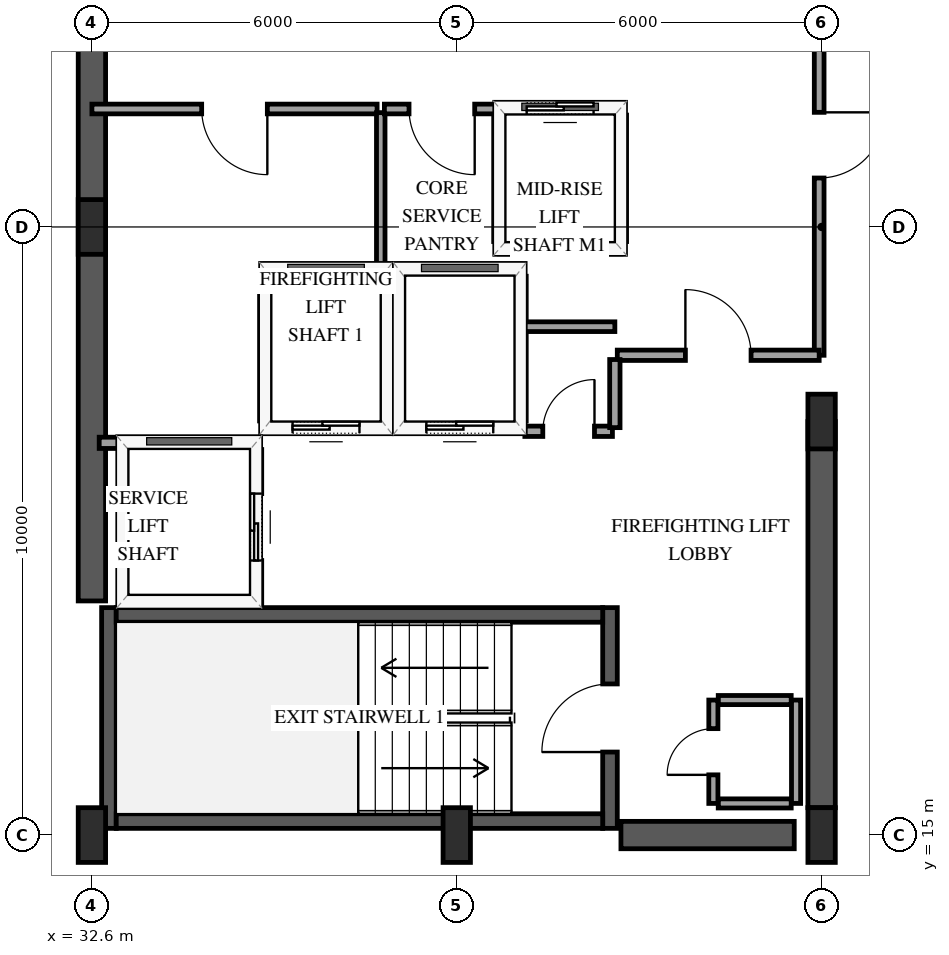
"""IFC4 building model, lengths in metres.
Left out: names, types, materials, properties, quantities, classifications, styles, units other than length and angle.
Written with IfcOpenShell. Run it as: python <this file> out.ifc"""

import sys

from ifc_helpers import new_model, si_unit, direction, frame, frame_2d, origin, origin_2d, place, context, subcontext, project, spatial, rectangle, extrude, element, fill, save


model = new_model("IFC4")
c1 = context("Model", 3, precision=1e-05, world=origin(), true_north=direction((0.0, 1.0)))
c2 = subcontext(c1, "Body", "Model", "MODEL_VIEW")
j1 = project(units=[si_unit("LENGTHUNIT", "METRE"), si_unit("PLANEANGLEUNIT", "RADIAN")], contexts=[c1])
p1 = place(None, origin())
s1 = spatial("IfcSite", under=j1, at=p1, CompositionType="ELEMENT")
p2 = place(p1, origin())
s2 = spatial("IfcBuilding", under=s1, at=p2, CompositionType="ELEMENT")
p3 = place(p2, frame((0.0, 0.0, 233.8)))
s3 = spatial("IfcBuildingStorey", under=s2, at=p3, CompositionType="ELEMENT", Elevation=233.8)
p4 = place(p3, frame((32.88, 15.11, 0.0), z_axis=(0.0, 0.0, 1.0), x_axis=(0.0, 1.0, 0.0)))
e1 = element("IfcWall", 1, at=p4, inside=s3, PredefinedType="SHEAR", context=c2, shape_type="SweptSolid", body=[
    extrude(rectangle(XDim=3.63, YDim=0.24, at=frame_2d((1.815, 0.0))), origin(), (0.0, 0.0, 1.0), 3.6),
])
p5 = place(p3, frame((41.12, 15.11, 0.0), z_axis=(0.0, 0.0, 1.0), x_axis=(0.0, 1.0, 0.0)))
e2 = element("IfcWall", 2, at=p5, inside=s3, PredefinedType="SHEAR", context=c2, shape_type="SweptSolid", body=[
    extrude(rectangle(XDim=3.63, YDim=0.24, at=frame_2d((1.815, 0.0))), origin(), (0.0, 0.0, 1.0), 3.6),
])
p6 = place(p5, frame((1.255, 0.0, 0.0)))
e3 = element("IfcOpeningElement", 3, at=p6, cuts=e2, PredefinedType="OPENING", context=c2, shape_type="SweptSolid", body=[
    extrude(rectangle(XDim=1.12, YDim=2.15, at=frame_2d((0.56, 1.075))), frame((0.0, 0.13, 0.0), z_axis=(0.0, -1.0, 0.0), x_axis=(1.0, 0.0, 0.0)), (0.0, 0.0, 1.0), 0.26),
])
for number, where, z_axis, x_axis in (
    (4, (33.0, 15.23, 0.0), (0.0, 0.0, 1.0), (1.0, 0.0, 0.0)),
    (5, (33.0, 18.62, 0.0), (0.0, 0.0, 1.0), (1.0, 0.0, 0.0)),
):
    element("IfcWall", number, at=place(p3, frame(where, z_axis=z_axis, x_axis=x_axis)), inside=s3, PredefinedType="SHEAR", context=c2, shape_type="SweptSolid", body=[
        extrude(rectangle(XDim=8.0, YDim=0.24, at=frame_2d((4.0, 0.0))), origin(), (0.0, 0.0, 1.0), 3.6),
    ])
p7 = place(p3, frame((32.6, 18.85, 0.0), z_axis=(0.0, 0.0, 1.0), x_axis=(0.0, 1.0, 0.0)))
e6 = element("IfcWall", 6, at=p7, inside=s3, PredefinedType="SHEAR", context=c2, shape_type="SweptSolid", body=[
    extrude(rectangle(XDim=12.3, YDim=0.45, at=frame_2d((6.15, 0.0))), origin(), (0.0, 0.0, 1.0), 3.6),
])
p8 = place(p3, frame((41.3, 15.0, 0.0), z_axis=(0.0, 0.0, 1.0), x_axis=(1.0, 0.0, 0.0)))
e7 = element("IfcWall", 7, at=p8, inside=s3, PredefinedType="SHEAR", context=c2, shape_type="SweptSolid", body=[
    extrude(rectangle(XDim=2.85, YDim=0.45, at=frame_2d((1.425, 0.0))), origin(), (0.0, 0.0, 1.0), 3.6),
])
p9 = place(p3, frame((44.6, 15.45, 0.0), z_axis=(0.0, 0.0, 1.0), x_axis=(0.0, 1.0, 0.0)))
e8 = element("IfcWall", 8, at=p9, inside=s3, PredefinedType="SHEAR", context=c2, shape_type="SweptSolid", body=[
    extrude(rectangle(XDim=6.35, YDim=0.45, at=frame_2d((3.175, 0.0))), origin(), (0.0, 0.0, 1.0), 3.6),
])
for number, where, z_axis, x_axis in (
    (9, (32.6, 15.0, 0.0), (0.0, 0.0, 1.0), (1.0, 0.0, 0.0)),
    (10, (32.6, 25.0, 0.0), (0.0, 0.0, 1.0), (1.0, 0.0, 0.0)),
    (11, (38.6, 15.0, 0.0), (0.0, 0.0, 1.0), (1.0, 0.0, 0.0)),
    (12, (44.6, 15.0, 0.0), (0.0, 0.0, 1.0), (1.0, 0.0, 0.0)),
    (13, (44.6, 21.8, 0.0), (0.0, 0.0, 1.0), (1.0, 0.0, 0.0)),
):
    element("IfcColumn", number, at=place(p3, frame(where, z_axis=z_axis, x_axis=x_axis)), inside=s3, PredefinedType="PILASTER", context=c2, shape_type="SweptSolid", body=[
        extrude(rectangle(XDim=0.45, YDim=0.9, at=origin_2d()), origin(), (0.0, 0.0, 1.0), 3.6),
    ])
p10 = place(p3, frame((35.45, 21.7, 0.0), z_axis=(0.0, 0.0, 1.0), x_axis=(1.0, 0.0, 0.0)))
e14 = element("IfcWall", 14, at=p10, inside=s3, PredefinedType="SOLIDWALL", context=c2, shape_type="SweptSolid", body=[
    extrude(rectangle(XDim=2.0, YDim=0.185, at=frame_2d((1.0, 0.0))), origin(), (0.0, 0.0, 1.0), 3.26),
])
p11 = place(p10, frame((0.45, 0.0, 0.0)))
e15 = element("IfcOpeningElement", 15, at=p11, cuts=e14, PredefinedType="OPENING", context=c2, shape_type="SweptSolid", body=[
    extrude(rectangle(XDim=1.1, YDim=2.15, at=frame_2d((0.55, 1.075))), frame((0.0, 0.103, 0.0), z_axis=(0.0, -1.0, 0.0), x_axis=(1.0, 0.0, 0.0)), (0.0, 0.0, 1.0), 0.205),
])
p12 = place(p3, frame((35.45, 24.3, 0.0), z_axis=(0.0, 0.0, 1.0), x_axis=(1.0, 0.0, 0.0)))
e16 = element("IfcWall", 16, at=p12, inside=s3, PredefinedType="SOLIDWALL", context=c2, shape_type="SweptSolid", body=[
    extrude(rectangle(XDim=2.0, YDim=0.185, at=frame_2d((1.0, 0.0))), origin(), (0.0, 0.0, 1.0), 3.26),
])
for number, where, z_axis, x_axis in (
    (17, (35.45, 21.81, 0.0), (0.0, 0.0, 1.0), (0.0, 1.0, 0.0)),
    (18, (37.45, 21.81, 0.0), (0.0, 0.0, 1.0), (0.0, 1.0, 0.0)),
):
    element("IfcWall", number, at=place(p3, frame(where, z_axis=z_axis, x_axis=x_axis)), inside=s3, PredefinedType="SOLIDWALL", context=c2, shape_type="SweptSolid", body=[
        extrude(rectangle(XDim=2.38, YDim=0.185, at=frame_2d((1.19, 0.0))), origin(), (0.0, 0.0, 1.0), 3.26),
    ])
p13 = place(p3, frame((37.65, 21.7, 0.0), z_axis=(0.0, 0.0, 1.0), x_axis=(1.0, 0.0, 0.0)))
e19 = element("IfcWall", 19, at=p13, inside=s3, PredefinedType="SOLIDWALL", context=c2, shape_type="SweptSolid", body=[
    extrude(rectangle(XDim=2.0, YDim=0.185, at=frame_2d((1.0, 0.0))), origin(), (0.0, 0.0, 1.0), 3.26),
])
p14 = place(p13, frame((0.45, 0.0, 0.0)))
e20 = element("IfcOpeningElement", 20, at=p14, cuts=e19, PredefinedType="OPENING", context=c2, shape_type="SweptSolid", body=[
    extrude(rectangle(XDim=1.1, YDim=2.15, at=frame_2d((0.55, 1.075))), frame((0.0, 0.103, 0.0), z_axis=(0.0, -1.0, 0.0), x_axis=(1.0, 0.0, 0.0)), (0.0, 0.0, 1.0), 0.205),
])
p15 = place(p3, frame((37.65, 24.3, 0.0), z_axis=(0.0, 0.0, 1.0), x_axis=(1.0, 0.0, 0.0)))
e21 = element("IfcWall", 21, at=p15, inside=s3, PredefinedType="SOLIDWALL", context=c2, shape_type="SweptSolid", body=[
    extrude(rectangle(XDim=2.0, YDim=0.185, at=frame_2d((1.0, 0.0))), origin(), (0.0, 0.0, 1.0), 3.26),
])
p16 = place(p3, frame((39.65, 21.81, 0.0), z_axis=(0.0, 0.0, 1.0), x_axis=(0.0, 1.0, 0.0)))
e22 = element("IfcWall", 22, at=p16, inside=s3, PredefinedType="SOLIDWALL", context=c2, shape_type="SweptSolid", body=[
    extrude(rectangle(XDim=2.38, YDim=0.185, at=frame_2d((1.19, 0.0))), origin(), (0.0, 0.0, 1.0), 3.26),
])
p17 = place(p3, frame((32.72, 21.45, 0.0), z_axis=(0.0, 0.0, 1.0), x_axis=(1.0, 0.0, 0.0)))
e23 = element("IfcWall", 23, at=p17, inside=s3, PredefinedType="SOLIDWALL", context=c2, shape_type="SweptSolid", body=[
    extrude(rectangle(XDim=2.58, YDim=0.185, at=frame_2d((1.29, 0.0))), origin(), (0.0, 0.0, 1.0), 3.26),
])
p18 = place(p3, frame((35.3, 18.79, 0.0), z_axis=(0.0, 0.0, 1.0), x_axis=(0.0, 1.0, 0.0)))
e24 = element("IfcWall", 24, at=p18, inside=s3, PredefinedType="SOLIDWALL", context=c2, shape_type="SweptSolid", body=[
    extrude(rectangle(XDim=2.55, YDim=0.185, at=frame_2d((1.275, 0.0))), origin(), (0.0, 0.0, 1.0), 3.26),
])
p19 = place(p18, frame((0.725, 0.0, 0.0)))
e25 = element("IfcOpeningElement", 25, at=p19, cuts=e24, PredefinedType="OPENING", context=c2, shape_type="SweptSolid", body=[
    extrude(rectangle(XDim=1.1, YDim=2.15, at=frame_2d((0.55, 1.075))), frame((0.0, 0.103, 0.0), z_axis=(0.0, -1.0, 0.0), x_axis=(1.0, 0.0, 0.0)), (0.0, 0.0, 1.0), 0.205),
])
p20 = place(p3, frame((39.3, 24.65, 0.0), z_axis=(0.0, 0.0, 1.0), x_axis=(1.0, 0.0, 0.0)))
e26 = element("IfcWall", 26, at=p20, inside=s3, PredefinedType="SOLIDWALL", context=c2, shape_type="SweptSolid", body=[
    extrude(rectangle(XDim=2.0, YDim=0.185, at=frame_2d((1.0, 0.0))), origin(), (0.0, 0.0, 1.0), 3.26),
])
p21 = place(p3, frame((39.3, 26.95, 0.0), z_axis=(0.0, 0.0, 1.0), x_axis=(1.0, 0.0, 0.0)))
e27 = element("IfcWall", 27, at=p21, inside=s3, PredefinedType="SOLIDWALL", context=c2, shape_type="SweptSolid", body=[
    extrude(rectangle(XDim=2.0, YDim=0.185, at=frame_2d((1.0, 0.0))), origin(), (0.0, 0.0, 1.0), 3.26),
])
p22 = place(p21, frame((0.45, 0.0, 0.0)))
e28 = element("IfcOpeningElement", 28, at=p22, cuts=e27, PredefinedType="OPENING", context=c2, shape_type="SweptSolid", body=[
    extrude(rectangle(XDim=1.1, YDim=2.15, at=frame_2d((0.55, 1.075))), frame((0.0, 0.103, 0.0), z_axis=(0.0, -1.0, 0.0), x_axis=(1.0, 0.0, 0.0)), (0.0, 0.0, 1.0), 0.205),
])
for number, where, z_axis, x_axis in (
    (29, (39.3, 24.76, 0.0), (0.0, 0.0, 1.0), (0.0, 1.0, 0.0)),
    (30, (41.3, 24.76, 0.0), (0.0, 0.0, 1.0), (0.0, 1.0, 0.0)),
):
    element("IfcWall", number, at=place(p3, frame(where, z_axis=z_axis, x_axis=x_axis)), inside=s3, PredefinedType="SOLIDWALL", context=c2, shape_type="SweptSolid", body=[
        extrude(rectangle(XDim=2.08, YDim=0.185, at=frame_2d((1.04, 0.0))), origin(), (0.0, 0.0, 1.0), 3.26),
    ])
for number, where, z_axis, x_axis in (
    (31, (42.9, 15.52, 0.0), (0.0, 0.0, 1.0), (1.0, 0.0, 0.0)),
    (32, (42.9, 17.22, 0.0), (0.0, 0.0, 1.0), (1.0, 0.0, 0.0)),
):
    element("IfcWall", number, at=place(p3, frame(where, z_axis=z_axis, x_axis=x_axis)), inside=s3, PredefinedType="PARTITIONING", context=c2, shape_type="SweptSolid", body=[
        extrude(rectangle(XDim=1.2, YDim=0.15, at=frame_2d((0.6, 0.0))), origin(), (0.0, 0.0, 1.0), 3.26),
    ])
p23 = place(p3, frame((44.18, 15.52, 0.0), z_axis=(0.0, 0.0, 1.0), x_axis=(0.0, 1.0, 0.0)))
e33 = element("IfcWall", 33, at=p23, inside=s3, PredefinedType="PARTITIONING", context=c2, shape_type="SweptSolid", body=[
    extrude(rectangle(XDim=1.7, YDim=0.15, at=frame_2d((0.85, 0.0))), origin(), (0.0, 0.0, 1.0), 3.26),
])
p24 = place(p3, frame((42.82, 15.52, 0.0), z_axis=(0.0, 0.0, 1.0), x_axis=(0.0, 1.0, 0.0)))
e34 = element("IfcWall", 34, at=p24, inside=s3, PredefinedType="PARTITIONING", context=c2, shape_type="SweptSolid", body=[
    extrude(rectangle(XDim=1.7, YDim=0.15, at=frame_2d((0.85, 0.0))), origin(), (0.0, 0.0, 1.0), 3.26),
])
p25 = place(p24, frame((0.47, 0.0, 0.0)))
e35 = element("IfcOpeningElement", 35, at=p25, cuts=e34, PredefinedType="OPENING", context=c2, shape_type="SweptSolid", body=[
    extrude(rectangle(XDim=0.76, YDim=2.0, at=frame_2d((0.38, 1.0))), frame((0.0, 0.085, 0.0), z_axis=(0.0, -1.0, 0.0), x_axis=(1.0, 0.0, 0.0)), (0.0, 0.0, 1.0), 0.17),
])
p26 = place(p3, frame((44.56, 29.8, 0.0), z_axis=(0.0, 0.0, 1.0), x_axis=(0.0, -1.0, 0.0)))
e36 = element("IfcWall", 36, at=p26, inside=s3, PredefinedType="PARTITIONING", context=c2, shape_type="SweptSolid", body=[
    extrude(rectangle(XDim=6.91, YDim=0.16, at=frame_2d((3.455, 0.0))), origin(), (0.0, 0.0, 1.0), 2.26),
])
p27 = place(p26, frame((2.915, 0.0, 0.0)))
e37 = element("IfcOpeningElement", 37, at=p27, cuts=e36, PredefinedType="OPENING", context=c2, shape_type="SweptSolid", body=[
    extrude(rectangle(XDim=1.08, YDim=2.15, at=frame_2d((0.54, 1.075))), frame((0.0, 0.09, 0.0), z_axis=(0.0, -1.0, 0.0), x_axis=(1.0, 0.0, 0.0)), (0.0, 0.0, 1.0), 0.18),
])
p28 = place(p3, frame((37.29, 26.94, 0.0), z_axis=(0.0, 0.0, 1.0), x_axis=(-1.0, 0.0, 0.0)))
e38 = element("IfcWall", 38, at=p28, inside=s3, PredefinedType="PARTITIONING", context=c2, shape_type="SweptSolid", body=[
    extrude(rectangle(XDim=4.69, YDim=0.16, at=frame_2d((2.345, 0.0))), origin(), (0.0, 0.0, 1.0), 3.26),
])
p29 = place(p28, frame((1.805, 0.0, 0.0)))
e39 = element("IfcOpeningElement", 39, at=p29, cuts=e38, PredefinedType="OPENING", context=c2, shape_type="SweptSolid", body=[
    extrude(rectangle(XDim=1.08, YDim=2.15, at=frame_2d((0.54, 1.075))), frame((0.0, 0.09, 0.0), z_axis=(0.0, -1.0, 0.0), x_axis=(1.0, 0.0, 0.0)), (0.0, 0.0, 1.0), 0.18),
])
p30 = place(p3, frame((41.24, 22.89, 0.0), z_axis=(0.0, 0.0, 1.0), x_axis=(1.0, 0.0, 0.0)))
e40 = element("IfcWall", 40, at=p30, inside=s3, PredefinedType="PARTITIONING", context=c2, shape_type="SweptSolid", body=[
    extrude(rectangle(XDim=3.32, YDim=0.17, at=frame_2d((1.66, 0.0))), origin(), (0.0, 0.0, 1.0), 3.26),
])
p31 = place(p30, frame((1.12, 0.0, 0.0)))
e41 = element("IfcOpeningElement", 41, at=p31, cuts=e40, PredefinedType="OPENING", context=c2, shape_type="SweptSolid", body=[
    extrude(rectangle(XDim=1.08, YDim=2.15, at=frame_2d((0.54, 1.075))), frame((0.0, 0.095, 0.0), z_axis=(0.0, -1.0, 0.0), x_axis=(1.0, 0.0, 0.0)), (0.0, 0.0, 1.0), 0.19),
])
p32 = place(p3, frame((37.35, 26.88, 0.0), z_axis=(0.0, 0.0, 1.0), x_axis=(0.0, -1.0, 0.0)))
e42 = element("IfcWall", 42, at=p32, inside=s3, PredefinedType="PARTITIONING", context=c2, shape_type="SweptSolid", body=[
    extrude(rectangle(XDim=2.58, YDim=0.14, at=frame_2d((1.29, 0.0))), origin(), (0.0, 0.0, 1.0), 3.26),
])
p33 = place(p3, frame((39.3, 26.94, 0.0), z_axis=(0.0, 0.0, 1.0), x_axis=(-1.0, 0.0, 0.0)))
e43 = element("IfcWall", 43, at=p33, inside=s3, PredefinedType="PARTITIONING", context=c2, shape_type="SweptSolid", body=[
    extrude(rectangle(XDim=1.89, YDim=0.16, at=frame_2d((0.945, 0.0))), origin(), (0.0, 0.0, 1.0), 3.26),
])
p34 = place(p33, frame((0.405, 0.0, 0.0)))
e44 = element("IfcOpeningElement", 44, at=p34, cuts=e43, PredefinedType="OPENING", context=c2, shape_type="SweptSolid", body=[
    extrude(rectangle(XDim=1.08, YDim=2.15, at=frame_2d((0.54, 1.075))), frame((0.0, 0.09, 0.0), z_axis=(0.0, -1.0, 0.0), x_axis=(1.0, 0.0, 0.0)), (0.0, 0.0, 1.0), 0.18),
])
p35 = place(p3, frame((39.72, 21.64, 0.0), z_axis=(0.0, 0.0, 1.0), x_axis=(1.0, 0.0, 0.0)))
e45 = element("IfcWall", 45, at=p35, inside=s3, PredefinedType="PARTITIONING", context=c2, shape_type="SweptSolid", body=[
    extrude(rectangle(XDim=1.44, YDim=0.17, at=frame_2d((0.72, 0.0))), origin(), (0.0, 0.0, 1.0), 3.26),
])
p36 = place(p35, frame((0.295, 0.0, 0.0)))
e46 = element("IfcOpeningElement", 46, at=p36, cuts=e45, PredefinedType="OPENING", context=c2, shape_type="SweptSolid", body=[
    extrude(rectangle(XDim=0.85, YDim=2.1, at=frame_2d((0.425, 1.05))), frame((0.0, 0.095, 0.0), z_axis=(0.0, -1.0, 0.0), x_axis=(1.0, 0.0, 0.0)), (0.0, 0.0, 1.0), 0.19),
])
p37 = place(p3, frame((41.2, 21.7, 0.0), z_axis=(0.0, 0.0, 1.0), x_axis=(0.0, 1.0, 0.0)))
e47 = element("IfcWall", 47, at=p37, inside=s3, PredefinedType="PARTITIONING", context=c2, shape_type="SweptSolid", body=[
    extrude(rectangle(XDim=1.12, YDim=0.17, at=frame_2d((0.56, 0.0))), origin(), (0.0, 0.0, 1.0), 3.26),
])
p38 = place(p3, frame((41.2, 23.36, 0.0), z_axis=(0.0, 0.0, 1.0), x_axis=(-1.0, 0.0, 0.0)))
e48 = element("IfcWall", 48, at=p38, inside=s3, PredefinedType="PARTITIONING", context=c2, shape_type="SweptSolid", body=[
    extrude(rectangle(XDim=1.48, YDim=0.16, at=frame_2d((0.74, 0.0))), origin(), (0.0, 0.0, 1.0), 3.26),
])
p39 = place(p11, origin())
e49 = element("IfcDoor", 49, at=p39, inside=s3, OperationType="SLIDING_TO_LEFT", PredefinedType="DOOR", context=c2, shape_type="SweptSolid", body=[
    extrude(rectangle(XDim=1.1, YDim=2.15, at=frame_2d((0.55, 1.075))), frame((0.0, 0.025, 0.0), z_axis=(0.0, -1.0, 0.0), x_axis=(1.0, 0.0, 0.0)), (0.0, 0.0, 1.0), 0.05),
])
fill(e15, e49)
p40 = place(p14, origin())
e50 = element("IfcDoor", 50, at=p40, inside=s3, OperationType="SLIDING_TO_LEFT", PredefinedType="DOOR", context=c2, shape_type="SweptSolid", body=[
    extrude(rectangle(XDim=1.1, YDim=2.15, at=frame_2d((0.55, 1.075))), frame((0.0, 0.025, 0.0), z_axis=(0.0, -1.0, 0.0), x_axis=(1.0, 0.0, 0.0)), (0.0, 0.0, 1.0), 0.05),
])
fill(e20, e50)
p41 = place(p19, origin())
e51 = element("IfcDoor", 51, at=p41, inside=s3, OperationType="SLIDING_TO_LEFT", PredefinedType="DOOR", context=c2, shape_type="SweptSolid", body=[
    extrude(rectangle(XDim=1.1, YDim=2.15, at=frame_2d((0.55, 1.075))), frame((0.0, 0.025, 0.0), z_axis=(0.0, -1.0, 0.0), x_axis=(1.0, 0.0, 0.0)), (0.0, 0.0, 1.0), 0.05),
])
fill(e25, e51)
p42 = place(p22, origin())
e52 = element("IfcDoor", 52, at=p42, inside=s3, OperationType="SLIDING_TO_LEFT", PredefinedType="DOOR", context=c2, shape_type="SweptSolid", body=[
    extrude(rectangle(XDim=1.1, YDim=2.15, at=frame_2d((0.55, 1.075))), frame((0.0, 0.025, 0.0), z_axis=(0.0, -1.0, 0.0), x_axis=(1.0, 0.0, 0.0)), (0.0, 0.0, 1.0), 0.05),
])
fill(e28, e52)
p43 = place(p6, origin())
e53 = element("IfcDoor", 53, at=p43, inside=s3, OperationType="SINGLE_SWING_LEFT", PredefinedType="DOOR", context=c2, shape_type="SweptSolid", body=[
    extrude(rectangle(XDim=1.12, YDim=2.15, at=frame_2d((0.56, 1.075))), frame((0.0, 0.025, 0.0), z_axis=(0.0, -1.0, 0.0), x_axis=(1.0, 0.0, 0.0)), (0.0, 0.0, 1.0), 0.05),
])
fill(e3, e53)
p44 = place(p25, origin())
e54 = element("IfcDoor", 54, at=p44, inside=s3, OperationType="SINGLE_SWING_LEFT", PredefinedType="TRAPDOOR", context=c2, shape_type="SweptSolid", body=[
    extrude(rectangle(XDim=0.76, YDim=2.0, at=frame_2d((0.38, 1.0))), frame((0.0, 0.025, 0.0), z_axis=(0.0, -1.0, 0.0), x_axis=(1.0, 0.0, 0.0)), (0.0, 0.0, 1.0), 0.05),
])
fill(e35, e54)
p45 = place(p27, origin())
e55 = element("IfcDoor", 55, at=p45, inside=s3, OperationType="SINGLE_SWING_LEFT", PredefinedType="DOOR", context=c2, shape_type="SweptSolid", body=[
    extrude(rectangle(XDim=1.08, YDim=2.15, at=frame_2d((0.54, 1.075))), frame((0.0, 0.025, 0.0), z_axis=(0.0, -1.0, 0.0), x_axis=(1.0, 0.0, 0.0)), (0.0, 0.0, 1.0), 0.05),
])
fill(e37, e55)
p46 = place(p29, origin())
e56 = element("IfcDoor", 56, at=p46, inside=s3, OperationType="SINGLE_SWING_LEFT", PredefinedType="DOOR", context=c2, shape_type="SweptSolid", body=[
    extrude(rectangle(XDim=1.08, YDim=2.15, at=frame_2d((0.54, 1.075))), frame((0.0, 0.025, 0.0), z_axis=(0.0, -1.0, 0.0), x_axis=(1.0, 0.0, 0.0)), (0.0, 0.0, 1.0), 0.05),
])
fill(e39, e56)
p47 = place(p31, origin())
e57 = element("IfcDoor", 57, at=p47, inside=s3, OperationType="SINGLE_SWING_LEFT", PredefinedType="DOOR", context=c2, shape_type="SweptSolid", body=[
    extrude(rectangle(XDim=1.08, YDim=2.15, at=frame_2d((0.54, 1.075))), frame((0.0, 0.025, 0.0), z_axis=(0.0, -1.0, 0.0), x_axis=(1.0, 0.0, 0.0)), (0.0, 0.0, 1.0), 0.05),
])
fill(e41, e57)
p48 = place(p34, origin())
e58 = element("IfcDoor", 58, at=p48, inside=s3, OperationType="SINGLE_SWING_LEFT", PredefinedType="DOOR", context=c2, shape_type="SweptSolid", body=[
    extrude(rectangle(XDim=1.08, YDim=2.15, at=frame_2d((0.54, 1.075))), frame((0.0, 0.025, 0.0), z_axis=(0.0, -1.0, 0.0), x_axis=(1.0, 0.0, 0.0)), (0.0, 0.0, 1.0), 0.05),
])
fill(e44, e58)
p49 = place(p36, origin())
e59 = element("IfcDoor", 59, at=p49, inside=s3, OperationType="SINGLE_SWING_RIGHT", PredefinedType="DOOR", context=c2, shape_type="SweptSolid", body=[
    extrude(rectangle(XDim=0.85, YDim=2.1, at=frame_2d((0.425, 1.05))), frame((0.0, 0.025, 0.0), z_axis=(0.0, -1.0, 0.0), x_axis=(1.0, 0.0, 0.0)), (0.0, 0.0, 1.0), 0.05),
])
fill(e46, e59)
save(model, sys.argv[1])
